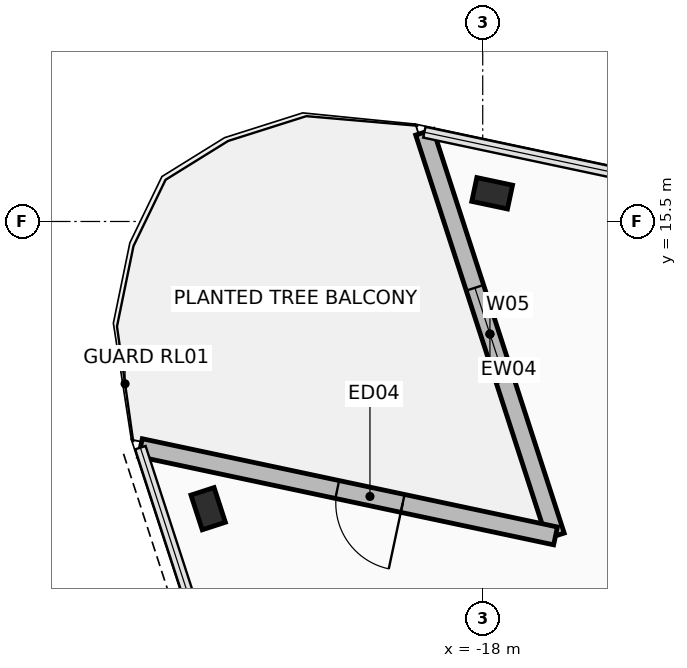
"""IFC4 building model, lengths in metres.
Left out: names, types, materials, properties, quantities, classifications, styles, units other than length and angle.
Written with IfcOpenShell. Run it as: python <this file> out.ifc"""

import sys

from ifc_helpers import new_model, si_unit, direction, frame, frame_2d, origin, origin_2d, place, context, subcontext, project, spatial, rectangle, hollow_rectangle, extrude, element, fill, save


model = new_model("IFC4")
c1 = context("Model", 3, precision=1e-05, world=origin(), true_north=direction((0.0, 1.0)))
c2 = subcontext(c1, "Body", "Model", "MODEL_VIEW")
j1 = project(units=[si_unit("LENGTHUNIT", "METRE"), si_unit("PLANEANGLEUNIT", "RADIAN")], contexts=[c1])
p1 = place(None, origin())
s1 = spatial("IfcSite", under=j1, at=p1, CompositionType="ELEMENT")
p2 = place(p1, origin())
s2 = spatial("IfcBuilding", under=s1, at=p2, CompositionType="ELEMENT")
p3 = place(p2, frame((0.0, 0.0, 218.45)))
s3 = spatial("IfcBuildingStorey", under=s2, at=p3, CompositionType="ELEMENT", Elevation=218.45)
for number, where, z_axis, x_axis in (
    (1, (-22.515, 10.777, 0.0), (0.0, 0.0, 1.0), (-0.309, 0.951, 0.0)),
    (2, (-17.845, 15.964, 0.0), (0.0, 0.0, 1.0), (-0.978, 0.208, 0.0)),
):
    element("IfcColumn", number, at=place(p3, frame(where, z_axis=z_axis, x_axis=x_axis)), inside=s3, PredefinedType="COLUMN", context=c2, shape_type="SweptSolid", body=[
        extrude(hollow_rectangle(XDim=0.4, YDim=0.6, WallThickness=0.03, at=origin_2d()), origin(), (0.0, 0.0, 1.0), 3.6),
    ])
p4 = place(p3, frame((-18.96, 16.968, 0.0), z_axis=(0.0, 0.0, 1.0), x_axis=(0.309030708092, -0.951052060329, 0.0)))
e3 = element("IfcWall", 3, at=p4, inside=s3, PredefinedType="STANDARD", context=c2, shape_type="SweptSolid", body=[
    extrude(rectangle(XDim=6.98, YDim=0.3, at=frame_2d((3.49, 0.0))), origin(), (0.0, 0.0, 1.0), 2.655),
])
p5 = place(p4, frame((2.69, 0.0, 0.275)))
e4 = element("IfcOpeningElement", 4, at=p5, cuts=e3, PredefinedType="OPENING", context=c2, shape_type="SweptSolid", body=[
    extrude(rectangle(XDim=1.6, YDim=2.2, at=frame_2d((0.8, 1.1))), frame((0.0, 0.16, 0.0), z_axis=(0.0, -1.0, 0.0), x_axis=(1.0, 0.0, 0.0)), (0.0, 0.0, 1.0), 0.32),
])
p6 = place(p3, frame((-16.803, 10.329, 0.0), z_axis=(0.0, 0.0, 1.0), x_axis=(-0.9781486268, 0.207906863497, 0.0)))
e5 = element("IfcWall", 5, at=p6, inside=s3, PredefinedType="STANDARD", context=c2, shape_type="SweptSolid", body=[
    extrude(rectangle(XDim=6.98, YDim=0.3, at=frame_2d((3.49, 0.0))), origin(), (0.0, 0.0, 1.0), 2.655),
])
p7 = place(p6, frame((2.57, 0.0, 0.0)))
e6 = element("IfcOpeningElement", 6, at=p7, cuts=e5, PredefinedType="OPENING", context=c2, shape_type="SweptSolid", body=[
    extrude(rectangle(XDim=1.1, YDim=2.2, at=frame_2d((0.55, 1.1))), frame((0.0, 0.16, 0.0), z_axis=(0.0, -1.0, 0.0), x_axis=(1.0, 0.0, 0.0)), (0.0, 0.0, 1.0), 0.32),
])
p8 = place(p7, origin())
e7 = element("IfcDoor", 7, at=p8, inside=s3, OperationType="SINGLE_SWING_LEFT", PredefinedType="DOOR", context=c2, shape_type="SweptSolid", body=[
    extrude(rectangle(XDim=1.1, YDim=2.2, at=frame_2d((0.55, 1.1))), frame((0.0, 0.025, 0.0), z_axis=(0.0, -1.0, 0.0), x_axis=(1.0, 0.0, 0.0)), (0.0, 0.0, 1.0), 0.05),
])
fill(e6, e7)
p9 = place(p5, origin())
e8 = element("IfcWindow", 8, at=p9, inside=s3, PartitioningType="SINGLE_PANEL", PredefinedType="WINDOW", context=c2, shape_type="SweptSolid", body=[
    extrude(rectangle(XDim=1.6, YDim=2.2, at=frame_2d((0.8, 1.1))), frame((0.0, 0.03, 0.0), z_axis=(0.0, -1.0, 0.0), x_axis=(1.0, 0.0, 0.0)), (0.0, 0.0, 1.0), 0.06),
])
fill(e4, e8)
save(model, sys.argv[1])
